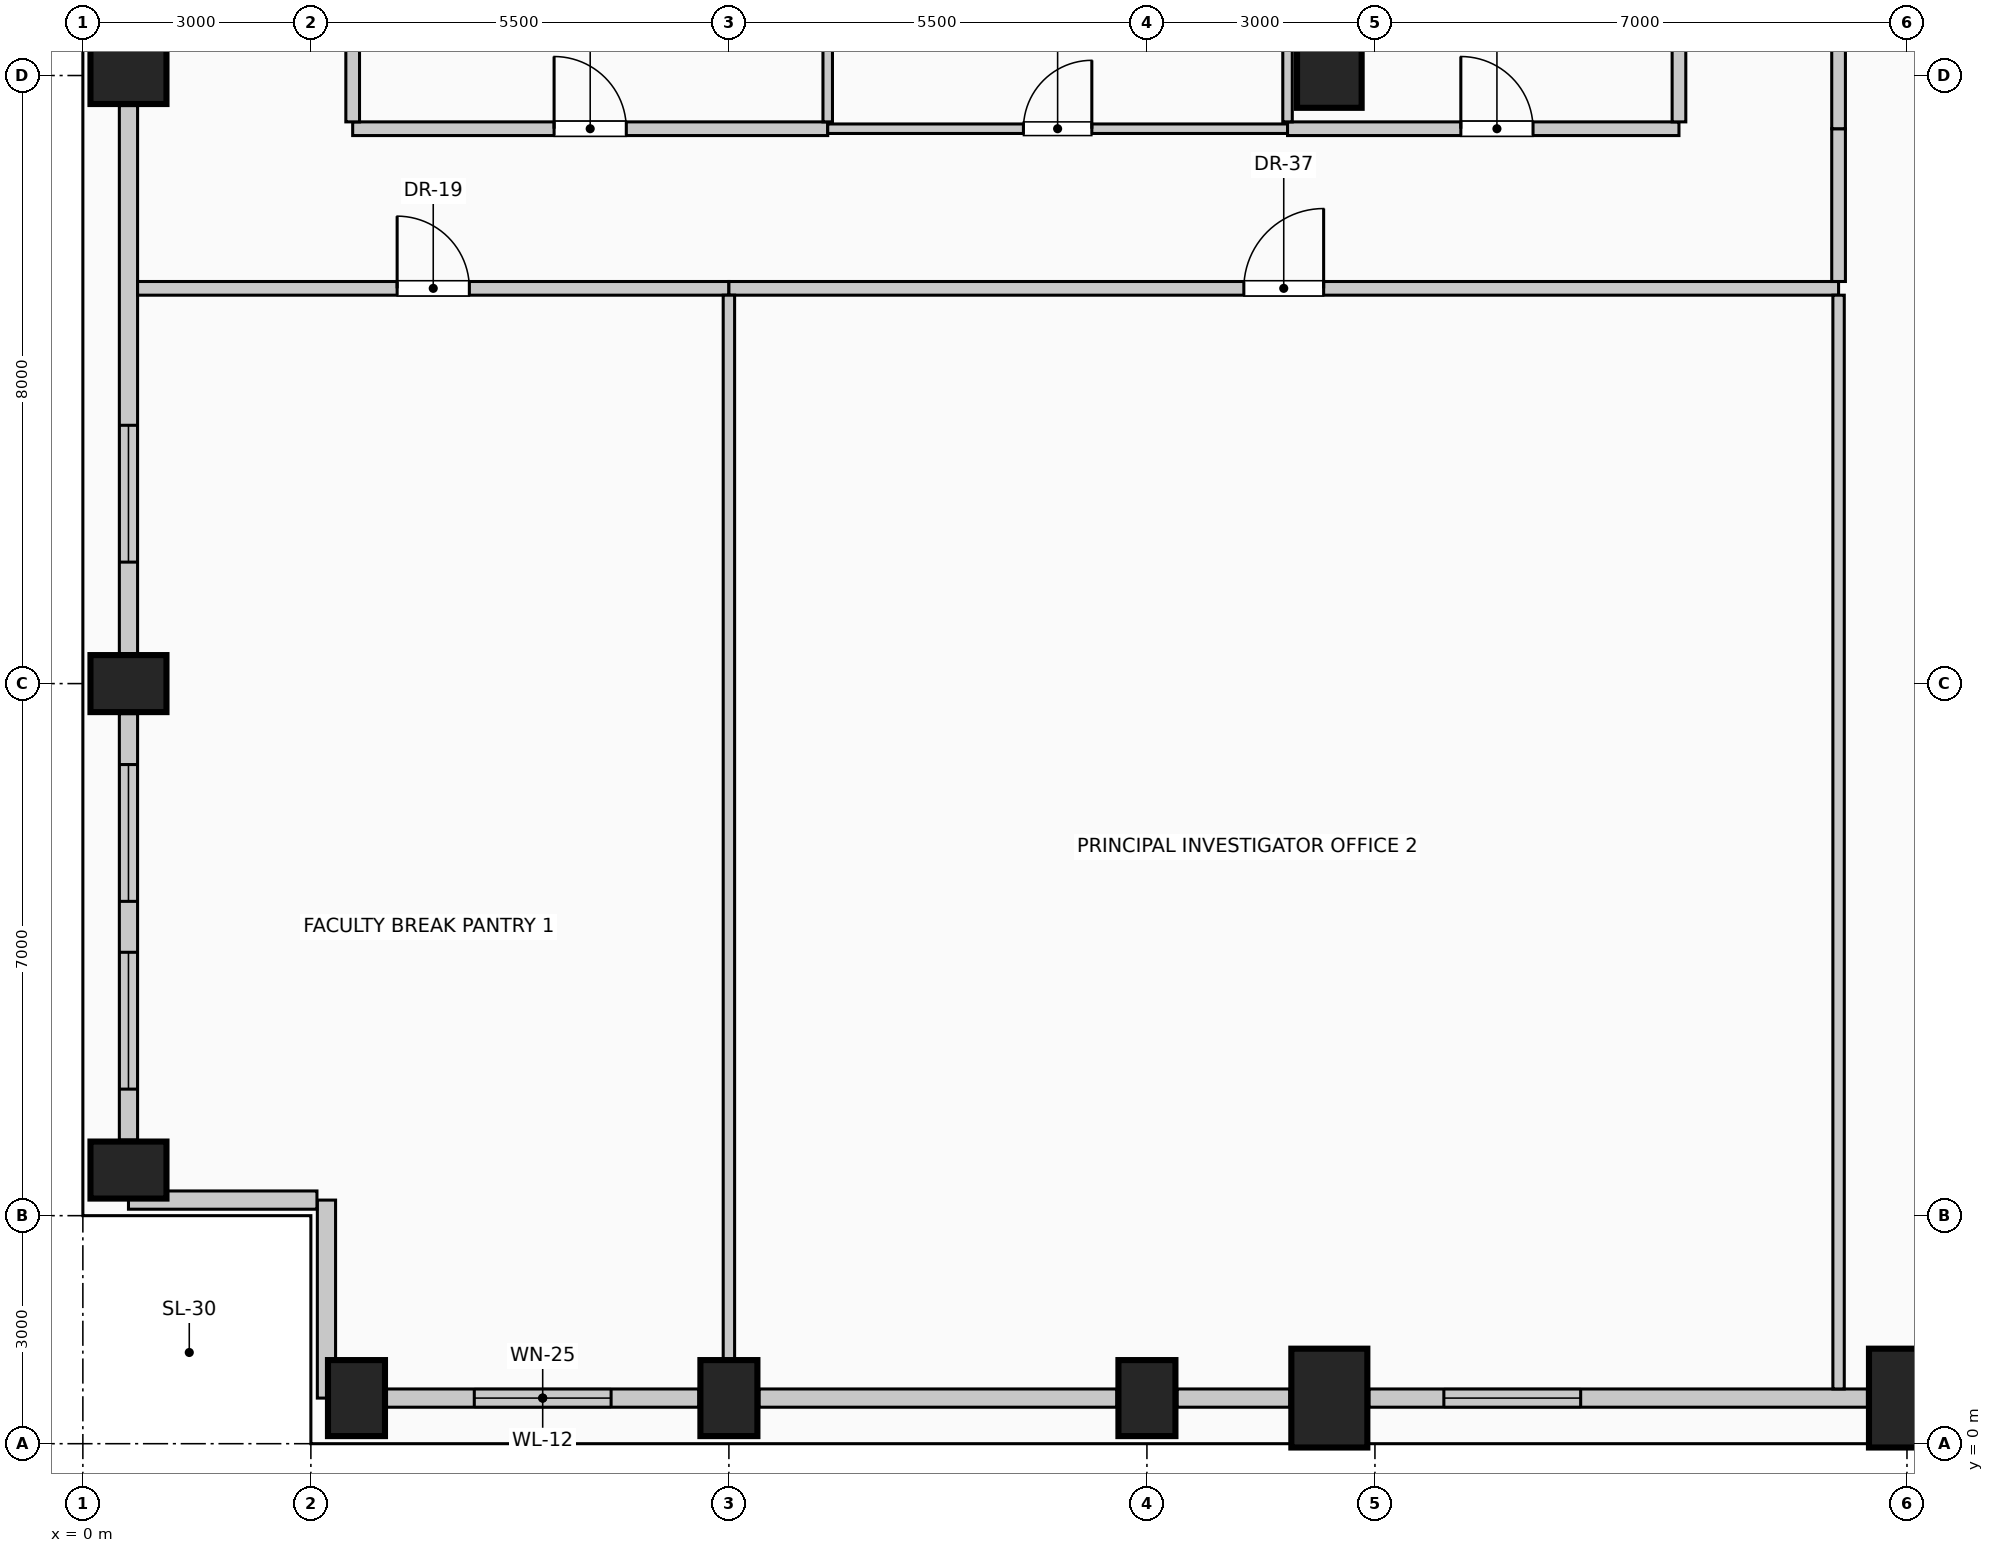
"""IFC4 building model, lengths in metres.
Left out: names, types, materials, properties, quantities, classifications, styles, units other than length and angle.
Written with IfcOpenShell. Run it as: python <this file> out.ifc"""

import sys

from ifc_helpers import new_model, si_unit, direction, frame, frame_2d, origin, origin_2d, place, context, subcontext, project, spatial, rectangle, circle, extrude, element, fill, save


model = new_model("IFC4")
c1 = context("Model", 3, precision=1e-05, world=origin(), true_north=direction((0.0, 1.0)))
c2 = subcontext(c1, "Body", "Model", "MODEL_VIEW")
j1 = project(units=[si_unit("LENGTHUNIT", "METRE"), si_unit("PLANEANGLEUNIT", "RADIAN")], contexts=[c1])
p1 = place(None, origin())
s1 = spatial("IfcSite", under=j1, at=p1, CompositionType="ELEMENT")
p2 = place(p1, origin())
s2 = spatial("IfcBuilding", under=s1, at=p2, CompositionType="ELEMENT")
p3 = place(p2, frame((0.0, 0.0, 230.6)))
s3 = spatial("IfcBuildingStorey", under=s2, at=p3, CompositionType="ELEMENT", Elevation=230.6)
for number, where, z_axis, x_axis in (
    (1, (3.6, 0.6, 0.0), (0.0, 0.0, 1.0), (1.0, 0.0, 0.0)),
    (2, (8.5, 0.6, 0.0), (0.0, 0.0, 1.0), (1.0, 0.0, 0.0)),
    (3, (14.0, 0.6, 0.0), (0.0, 0.0, 1.0), (1.0, 0.0, 0.0)),
):
    element("IfcColumn", number, at=place(p3, frame(where, z_axis=z_axis, x_axis=x_axis)), inside=s3, PredefinedType="COLUMN", context=c2, shape_type="SweptSolid", body=[
        extrude(rectangle(XDim=0.75, YDim=1.0, at=origin_2d()), origin(), (0.0, 0.0, 1.0), 4.0),
    ])
for number, where, z_axis, x_axis in (
    (4, (16.4, 0.6, 0.0), (0.0, 0.0, 1.0), (1.0, 0.0, 0.0)),
    (5, (24.0, 0.6, 0.0), (0.0, 0.0, 1.0), (1.0, 0.0, 0.0)),
):
    element("IfcColumn", number, at=place(p3, frame(where, z_axis=z_axis, x_axis=x_axis)), inside=s3, PredefinedType="COLUMN", context=c2, shape_type="SweptSolid", body=[
        extrude(rectangle(XDim=1.0, YDim=1.3, at=origin_2d()), origin(), (0.0, 0.0, 1.0), 4.0),
    ])
for number, where, z_axis, x_axis in (
    (6, (0.6, 3.6, 0.0), (0.0, 0.0, 1.0), (0.0, 1.0, 0.0)),
    (7, (0.6, 10.0, 0.0), (0.0, 0.0, 1.0), (0.0, 1.0, 0.0)),
    (8, (0.6, 18.0, 0.0), (0.0, 0.0, 1.0), (0.0, 1.0, 0.0)),
):
    element("IfcColumn", number, at=place(p3, frame(where, z_axis=z_axis, x_axis=x_axis)), inside=s3, PredefinedType="COLUMN", context=c2, shape_type="SweptSolid", body=[
        extrude(rectangle(XDim=0.75, YDim=1.0, at=origin_2d()), origin(), (0.0, 0.0, 1.0), 4.0),
    ])
p4 = place(p3, frame((16.4, 18.0, 0.0), z_axis=(0.0, 0.0, 1.0), x_axis=(1.0, 0.0, 0.0)))
e9 = element("IfcColumn", 9, at=p4, inside=s3, PredefinedType="COLUMN", context=c2, shape_type="SweptSolid", body=[
    extrude(circle(Radius=0.425, at=origin_2d()), origin(), (0.0, 0.0, 1.0), 4.0),
])
p5 = place(p3, frame((8.105, 0.6, 0.0), z_axis=(0.0, 0.0, 1.0), x_axis=(-1.0, 0.0, 0.0)))
e10 = element("IfcWall", 10, at=p5, inside=s3, PredefinedType="SOLIDWALL", context=c2, shape_type="SweptSolid", body=[
    extrude(rectangle(XDim=4.11, YDim=0.24, at=frame_2d((2.055, 0.0))), origin(), (0.0, 0.0, 1.0), 3.0),
])
p6 = place(p5, frame((1.155, 0.0, 0.42)))
e11 = element("IfcOpeningElement", 11, at=p6, cuts=e10, PredefinedType="OPENING", context=c2, shape_type="SweptSolid", body=[
    extrude(rectangle(XDim=1.8, YDim=2.2, at=frame_2d((0.9, 1.1))), frame((0.0, 0.13, 0.0), z_axis=(0.0, -1.0, 0.0), x_axis=(1.0, 0.0, 0.0)), (0.0, 0.0, 1.0), 0.26),
])
p7 = place(p3, frame((13.605, 0.6, 0.0), z_axis=(0.0, 0.0, 1.0), x_axis=(-1.0, 0.0, 0.0)))
e12 = element("IfcWall", 12, at=p7, inside=s3, PredefinedType="SOLIDWALL", context=c2, shape_type="SweptSolid", body=[
    extrude(rectangle(XDim=4.71, YDim=0.24, at=frame_2d((2.355, 0.0))), origin(), (0.0, 0.0, 1.0), 3.0),
])
p8 = place(p3, frame((15.88, 0.6, 0.0), z_axis=(0.0, 0.0, 1.0), x_axis=(-1.0, 0.0, 0.0)))
e13 = element("IfcWall", 13, at=p8, inside=s3, PredefinedType="SOLIDWALL", context=c2, shape_type="SweptSolid", body=[
    extrude(rectangle(XDim=1.485, YDim=0.24, at=frame_2d((0.742, 0.0))), origin(), (0.0, 0.0, 1.0), 3.0),
])
p9 = place(p3, frame((23.48, 0.6, 0.0), z_axis=(0.0, 0.0, 1.0), x_axis=(-1.0, 0.0, 0.0)))
e14 = element("IfcWall", 14, at=p9, inside=s3, PredefinedType="SOLIDWALL", context=c2, shape_type="SweptSolid", body=[
    extrude(rectangle(XDim=6.56, YDim=0.24, at=frame_2d((3.28, 0.0))), origin(), (0.0, 0.0, 1.0), 3.0),
])
p10 = place(p9, frame((3.773, 0.0, 0.42)))
e15 = element("IfcOpeningElement", 15, at=p10, cuts=e14, PredefinedType="OPENING", context=c2, shape_type="SweptSolid", body=[
    extrude(rectangle(XDim=1.8, YDim=2.2, at=frame_2d((0.9, 1.1))), frame((0.0, 0.13, 0.0), z_axis=(0.0, -1.0, 0.0), x_axis=(1.0, 0.0, 0.0)), (0.0, 0.0, 1.0), 0.26),
])
p11 = place(p3, frame((0.6, 3.995, 0.0), z_axis=(0.0, 0.0, 1.0), x_axis=(0.0, 1.0, 0.0)))
e16 = element("IfcWall", 16, at=p11, inside=s3, PredefinedType="SOLIDWALL", context=c2, shape_type="SweptSolid", body=[
    extrude(rectangle(XDim=5.61, YDim=0.24, at=frame_2d((2.805, 0.0))), origin(), (0.0, 0.0, 1.0), 3.0),
])
p12 = place(p11, frame((0.67, 0.0, 0.42)))
e17 = element("IfcOpeningElement", 17, at=p12, cuts=e16, PredefinedType="OPENING", context=c2, shape_type="SweptSolid", body=[
    extrude(rectangle(XDim=1.8, YDim=2.2, at=frame_2d((0.9, 1.1))), frame((0.0, 0.13, 0.0), z_axis=(0.0, -1.0, 0.0), x_axis=(1.0, 0.0, 0.0)), (0.0, 0.0, 1.0), 0.26),
])
p13 = place(p11, frame((3.14, 0.0, 0.42)))
e18 = element("IfcOpeningElement", 18, at=p13, cuts=e16, PredefinedType="OPENING", context=c2, shape_type="SweptSolid", body=[
    extrude(rectangle(XDim=1.8, YDim=2.2, at=frame_2d((0.9, 1.1))), frame((0.0, 0.13, 0.0), z_axis=(0.0, -1.0, 0.0), x_axis=(1.0, 0.0, 0.0)), (0.0, 0.0, 1.0), 0.26),
])
p14 = place(p3, frame((0.6, 10.395, 0.0), z_axis=(0.0, 0.0, 1.0), x_axis=(0.0, 1.0, 0.0)))
e19 = element("IfcWall", 19, at=p14, inside=s3, PredefinedType="SOLIDWALL", context=c2, shape_type="SweptSolid", body=[
    extrude(rectangle(XDim=7.21, YDim=0.24, at=frame_2d((3.605, 0.0))), origin(), (0.0, 0.0, 1.0), 3.0),
])
p15 = place(p14, frame((1.203, 0.0, 0.42)))
e20 = element("IfcOpeningElement", 20, at=p15, cuts=e19, PredefinedType="OPENING", context=c2, shape_type="SweptSolid", body=[
    extrude(rectangle(XDim=1.8, YDim=2.2, at=frame_2d((0.9, 1.1))), frame((0.0, 0.13, 0.0), z_axis=(0.0, -1.0, 0.0), x_axis=(1.0, 0.0, 0.0)), (0.0, 0.0, 1.0), 0.26),
])
p16 = place(p3, frame((3.205, 0.6, 0.0), z_axis=(0.0, 0.0, 1.0), x_axis=(0.0, 1.0, 0.0)))
e21 = element("IfcWall", 21, at=p16, inside=s3, PredefinedType="SOLIDWALL", context=c2, shape_type="SweptSolid", body=[
    extrude(rectangle(XDim=2.605, YDim=0.24, at=frame_2d((1.302, 0.0))), origin(), (0.0, 0.0, 1.0), 3.75),
])
p17 = place(p3, frame((3.08, 3.205, 0.0), z_axis=(0.0, 0.0, 1.0), x_axis=(-1.0, 0.0, 0.0)))
e22 = element("IfcWall", 22, at=p17, inside=s3, PredefinedType="SOLIDWALL", context=c2, shape_type="SweptSolid", body=[
    extrude(rectangle(XDim=2.48, YDim=0.24, at=frame_2d((1.24, 0.0))), origin(), (0.0, 0.0, 1.0), 3.75),
])
p18 = place(p3, frame((0.72, 15.2, 0.0), z_axis=(0.0, 0.0, 1.0), x_axis=(1.0, 0.0, 0.0)))
e23 = element("IfcWall", 23, at=p18, inside=s3, PredefinedType="PARTITIONING", context=c2, shape_type="SweptSolid", body=[
    extrude(rectangle(XDim=7.78, YDim=0.18, at=frame_2d((3.89, 0.0))), origin(), (0.0, 0.0, 1.0), 3.75),
])
p19 = place(p18, frame((3.415, 0.0, 0.0)))
e24 = element("IfcOpeningElement", 24, at=p19, cuts=e23, PredefinedType="OPENING", context=c2, shape_type="SweptSolid", body=[
    extrude(rectangle(XDim=0.95, YDim=2.15, at=frame_2d((0.475, 1.075))), frame((0.0, 0.1, 0.0), z_axis=(0.0, -1.0, 0.0), x_axis=(1.0, 0.0, 0.0)), (0.0, 0.0, 1.0), 0.2),
])
p20 = place(p3, frame((8.5, 15.2, 0.0), z_axis=(0.0, 0.0, 1.0), x_axis=(1.0, 0.0, 0.0)))
e25 = element("IfcWall", 25, at=p20, inside=s3, PredefinedType="PARTITIONING", context=c2, shape_type="SweptSolid", body=[
    extrude(rectangle(XDim=14.6, YDim=0.18, at=frame_2d((7.3, 0.0))), origin(), (0.0, 0.0, 1.0), 3.75),
])
p21 = place(p20, frame((6.775, 0.0, 0.0)))
e26 = element("IfcOpeningElement", 26, at=p21, cuts=e25, PredefinedType="OPENING", context=c2, shape_type="SweptSolid", body=[
    extrude(rectangle(XDim=1.05, YDim=2.15, at=frame_2d((0.525, 1.075))), frame((0.0, 0.1, 0.0), z_axis=(0.0, -1.0, 0.0), x_axis=(1.0, 0.0, 0.0)), (0.0, 0.0, 1.0), 0.2),
])
p22 = place(p3, frame((3.55, 17.3, 0.0), z_axis=(0.0, 0.0, 1.0), x_axis=(1.0, 0.0, 0.0)))
e27 = element("IfcWall", 27, at=p22, inside=s3, PredefinedType="PARTITIONING", context=c2, shape_type="SweptSolid", body=[
    extrude(rectangle(XDim=6.25, YDim=0.18, at=frame_2d((3.125, 0.0))), origin(), (0.0, 0.0, 1.0), 3.75),
])
p23 = place(p22, frame((2.65, 0.0, 0.0)))
e28 = element("IfcOpeningElement", 28, at=p23, cuts=e27, PredefinedType="OPENING", context=c2, shape_type="SweptSolid", body=[
    extrude(rectangle(XDim=0.95, YDim=2.15, at=frame_2d((0.475, 1.075))), frame((0.0, 0.1, 0.0), z_axis=(0.0, -1.0, 0.0), x_axis=(1.0, 0.0, 0.0)), (0.0, 0.0, 1.0), 0.2),
])
p24 = place(p3, frame((9.8, 17.3, 0.0), z_axis=(0.0, 0.0, 1.0), x_axis=(1.0, 0.0, 0.0)))
e29 = element("IfcWall", 29, at=p24, inside=s3, PredefinedType="PARTITIONING", context=c2, shape_type="SweptSolid", body=[
    extrude(rectangle(XDim=6.05, YDim=0.125, at=frame_2d((3.025, 0.0))), origin(), (0.0, 0.0, 1.0), 3.75),
])
p25 = place(p24, frame((2.575, 0.0, 0.0)))
e30 = element("IfcOpeningElement", 30, at=p25, cuts=e29, PredefinedType="OPENING", context=c2, shape_type="SweptSolid", body=[
    extrude(rectangle(XDim=0.9, YDim=2.1, at=frame_2d((0.45, 1.05))), frame((0.0, 0.073, 0.0), z_axis=(0.0, -1.0, 0.0), x_axis=(1.0, 0.0, 0.0)), (0.0, 0.0, 1.0), 0.145),
])
p26 = place(p3, frame((15.85, 17.3, 0.0), z_axis=(0.0, 0.0, 1.0), x_axis=(1.0, 0.0, 0.0)))
e31 = element("IfcWall", 31, at=p26, inside=s3, PredefinedType="PARTITIONING", context=c2, shape_type="SweptSolid", body=[
    extrude(rectangle(XDim=5.15, YDim=0.18, at=frame_2d((2.575, 0.0))), origin(), (0.0, 0.0, 1.0), 3.75),
])
p27 = place(p26, frame((2.28, 0.0, 0.0)))
e32 = element("IfcOpeningElement", 32, at=p27, cuts=e31, PredefinedType="OPENING", context=c2, shape_type="SweptSolid", body=[
    extrude(rectangle(XDim=0.95, YDim=2.15, at=frame_2d((0.475, 1.075))), frame((0.0, 0.1, 0.0), z_axis=(0.0, -1.0, 0.0), x_axis=(1.0, 0.0, 0.0)), (0.0, 0.0, 1.0), 0.2),
])
p28 = place(p3, frame((3.55, 17.39, 0.0), z_axis=(0.0, 0.0, 1.0), x_axis=(0.0, 1.0, 0.0)))
e33 = element("IfcWall", 33, at=p28, inside=s3, PredefinedType="PARTITIONING", context=c2, shape_type="SweptSolid", body=[
    extrude(rectangle(XDim=7.335, YDim=0.18, at=frame_2d((3.667, 0.0))), origin(), (0.0, 0.0, 1.0), 3.75),
])
p29 = place(p3, frame((8.5, 1.1, 0.0), z_axis=(0.0, 0.0, 1.0), x_axis=(0.0, 1.0, 0.0)))
e34 = element("IfcWall", 34, at=p29, inside=s3, PredefinedType="PARTITIONING", context=c2, shape_type="SweptSolid", body=[
    extrude(rectangle(XDim=14.01, YDim=0.15, at=frame_2d((7.005, 0.0))), origin(), (0.0, 0.0, 1.0), 3.75),
])
for number, where, z_axis, x_axis in (
    (35, (9.8, 17.39, 0.0), (0.0, 0.0, 1.0), (0.0, 1.0, 0.0)),
    (36, (15.85, 17.39, 0.0), (0.0, 0.0, 1.0), (0.0, 1.0, 0.0)),
):
    element("IfcWall", number, at=place(p3, frame(where, z_axis=z_axis, x_axis=x_axis)), inside=s3, PredefinedType="PARTITIONING", context=c2, shape_type="SweptSolid", body=[
        extrude(rectangle(XDim=7.335, YDim=0.125, at=frame_2d((3.667, 0.0))), origin(), (0.0, 0.0, 1.0), 3.75),
    ])
p30 = place(p3, frame((21.0, 17.39, 0.0), z_axis=(0.0, 0.0, 1.0), x_axis=(0.0, 1.0, 0.0)))
e37 = element("IfcWall", 37, at=p30, inside=s3, PredefinedType="PARTITIONING", context=c2, shape_type="SweptSolid", body=[
    extrude(rectangle(XDim=7.335, YDim=0.18, at=frame_2d((3.667, 0.0))), origin(), (0.0, 0.0, 1.0), 3.75),
])
p31 = place(p3, frame((23.1, 0.72, 0.0), z_axis=(0.0, 0.0, 1.0), x_axis=(0.0, 1.0, 0.0)))
e38 = element("IfcWall", 38, at=p31, inside=s3, PredefinedType="PARTITIONING", context=c2, shape_type="SweptSolid", body=[
    extrude(rectangle(XDim=14.39, YDim=0.15, at=frame_2d((7.195, 0.0))), origin(), (0.0, 0.0, 1.0), 3.75),
])
p32 = place(p3, frame((23.1, 15.29, 0.0), z_axis=(0.0, 0.0, 1.0), x_axis=(0.0, 1.0, 0.0)))
e39 = element("IfcWall", 39, at=p32, inside=s3, PredefinedType="PARTITIONING", context=c2, shape_type="SweptSolid", body=[
    extrude(rectangle(XDim=2.01, YDim=0.18, at=frame_2d((1.005, 0.0))), origin(), (0.0, 0.0, 1.0), 3.75),
])
p33 = place(p3, frame((23.1, 17.3, 0.0), z_axis=(0.0, 0.0, 1.0), x_axis=(0.0, 1.0, 0.0)))
e40 = element("IfcWall", 40, at=p33, inside=s3, PredefinedType="PARTITIONING", context=c2, shape_type="SweptSolid", body=[
    extrude(rectangle(XDim=9.51, YDim=0.18, at=frame_2d((4.755, 0.0))), origin(), (0.0, 0.0, 1.0), 3.75),
])
p34 = place(p6, origin())
e41 = element("IfcWindow", 41, at=p34, inside=s3, PartitioningType="SINGLE_PANEL", PredefinedType="WINDOW", context=c2, shape_type="SweptSolid", body=[
    extrude(rectangle(XDim=1.8, YDim=2.2, at=frame_2d((0.9, 1.1))), frame((0.0, 0.03, 0.0), z_axis=(0.0, -1.0, 0.0), x_axis=(1.0, 0.0, 0.0)), (0.0, 0.0, 1.0), 0.06),
])
fill(e11, e41)
p35 = place(p10, origin())
e42 = element("IfcWindow", 42, at=p35, inside=s3, PartitioningType="SINGLE_PANEL", PredefinedType="WINDOW", context=c2, shape_type="SweptSolid", body=[
    extrude(rectangle(XDim=1.8, YDim=2.2, at=frame_2d((0.9, 1.1))), frame((0.0, 0.03, 0.0), z_axis=(0.0, -1.0, 0.0), x_axis=(1.0, 0.0, 0.0)), (0.0, 0.0, 1.0), 0.06),
])
fill(e15, e42)
p36 = place(p12, origin())
e43 = element("IfcWindow", 43, at=p36, inside=s3, PartitioningType="SINGLE_PANEL", PredefinedType="WINDOW", context=c2, shape_type="SweptSolid", body=[
    extrude(rectangle(XDim=1.8, YDim=2.2, at=frame_2d((0.9, 1.1))), frame((0.0, 0.03, 0.0), z_axis=(0.0, -1.0, 0.0), x_axis=(1.0, 0.0, 0.0)), (0.0, 0.0, 1.0), 0.06),
])
fill(e17, e43)
p37 = place(p13, origin())
e44 = element("IfcWindow", 44, at=p37, inside=s3, PartitioningType="SINGLE_PANEL", PredefinedType="WINDOW", context=c2, shape_type="SweptSolid", body=[
    extrude(rectangle(XDim=1.8, YDim=2.2, at=frame_2d((0.9, 1.1))), frame((0.0, 0.03, 0.0), z_axis=(0.0, -1.0, 0.0), x_axis=(1.0, 0.0, 0.0)), (0.0, 0.0, 1.0), 0.06),
])
fill(e18, e44)
p38 = place(p15, origin())
e45 = element("IfcWindow", 45, at=p38, inside=s3, PartitioningType="SINGLE_PANEL", PredefinedType="WINDOW", context=c2, shape_type="SweptSolid", body=[
    extrude(rectangle(XDim=1.8, YDim=2.2, at=frame_2d((0.9, 1.1))), frame((0.0, 0.03, 0.0), z_axis=(0.0, -1.0, 0.0), x_axis=(1.0, 0.0, 0.0)), (0.0, 0.0, 1.0), 0.06),
])
fill(e20, e45)
p39 = place(p19, origin())
e46 = element("IfcDoor", 46, at=p39, inside=s3, OperationType="SINGLE_SWING_LEFT", PredefinedType="DOOR", context=c2, shape_type="SweptSolid", body=[
    extrude(rectangle(XDim=0.95, YDim=2.15, at=frame_2d((0.475, 1.075))), frame((0.0, 0.025, 0.0), z_axis=(0.0, -1.0, 0.0), x_axis=(1.0, 0.0, 0.0)), (0.0, 0.0, 1.0), 0.05),
])
fill(e24, e46)
p40 = place(p21, origin())
e47 = element("IfcDoor", 47, at=p40, inside=s3, OperationType="SINGLE_SWING_RIGHT", PredefinedType="DOOR", context=c2, shape_type="SweptSolid", body=[
    extrude(rectangle(XDim=1.05, YDim=2.15, at=frame_2d((0.525, 1.075))), frame((0.0, 0.025, 0.0), z_axis=(0.0, -1.0, 0.0), x_axis=(1.0, 0.0, 0.0)), (0.0, 0.0, 1.0), 0.05),
])
fill(e26, e47)
p41 = place(p23, origin())
e48 = element("IfcDoor", 48, at=p41, inside=s3, OperationType="SINGLE_SWING_LEFT", PredefinedType="DOOR", context=c2, shape_type="SweptSolid", body=[
    extrude(rectangle(XDim=0.95, YDim=2.15, at=frame_2d((0.475, 1.075))), frame((0.0, 0.025, 0.0), z_axis=(0.0, -1.0, 0.0), x_axis=(1.0, 0.0, 0.0)), (0.0, 0.0, 1.0), 0.05),
])
fill(e28, e48)
p42 = place(p25, origin())
e49 = element("IfcDoor", 49, at=p42, inside=s3, OperationType="SINGLE_SWING_RIGHT", PredefinedType="DOOR", context=c2, shape_type="SweptSolid", body=[
    extrude(rectangle(XDim=0.9, YDim=2.1, at=frame_2d((0.45, 1.05))), frame((0.0, 0.025, 0.0), z_axis=(0.0, -1.0, 0.0), x_axis=(1.0, 0.0, 0.0)), (0.0, 0.0, 1.0), 0.05),
])
fill(e30, e49)
p43 = place(p27, origin())
e50 = element("IfcDoor", 50, at=p43, inside=s3, OperationType="SINGLE_SWING_LEFT", PredefinedType="DOOR", context=c2, shape_type="SweptSolid", body=[
    extrude(rectangle(XDim=0.95, YDim=2.15, at=frame_2d((0.475, 1.075))), frame((0.0, 0.025, 0.0), z_axis=(0.0, -1.0, 0.0), x_axis=(1.0, 0.0, 0.0)), (0.0, 0.0, 1.0), 0.05),
])
fill(e32, e50)
save(model, sys.argv[1])
